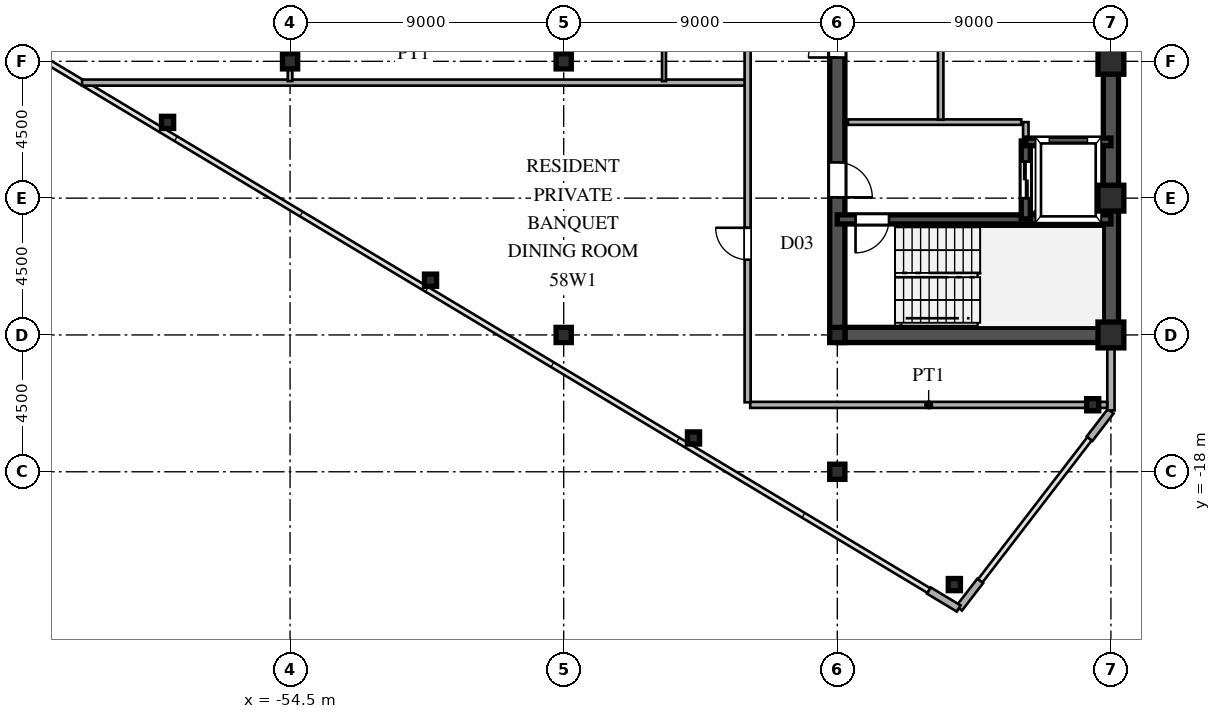
"""IFC4 building model, lengths in metres.
Left out: names, types, materials, properties, quantities, classifications, styles, units other than length and angle.
Written with IfcOpenShell. Run it as: python <this file> out.ifc"""

import sys

from ifc_helpers import new_model, si_unit, direction, frame, frame_2d, origin, origin_2d, place, context, subcontext, project, spatial, rectangle, hollow_rectangle, i_section, extrude, source, transform, mapped, element, fill, save


model = new_model("IFC4")
c1 = context("Model", 3, precision=1e-05, world=origin(), true_north=direction((0.0, 1.0)))
c2 = subcontext(c1, "Body", "Model", "MODEL_VIEW")
j1 = project(units=[si_unit("LENGTHUNIT", "METRE"), si_unit("PLANEANGLEUNIT", "RADIAN")], contexts=[c1])
p1 = place(None, origin())
s1 = spatial("IfcSite", under=j1, at=p1, CompositionType="ELEMENT")
p2 = place(p1, origin())
s2 = spatial("IfcBuilding", under=s1, at=p2, CompositionType="ELEMENT")
p3 = place(p2, frame((0.0, 0.0, 217.5)))
s3 = spatial("IfcBuildingStorey", under=s2, at=p3, CompositionType="ELEMENT", Elevation=217.5)
m1 = source(origin(), c2, "Body", "SweptSolid", [
    extrude(hollow_rectangle(XDim=0.85, YDim=0.85, WallThickness=0.036, at=origin_2d()), origin(), (0.0, 0.0, 1.0), 3.6),
])
for number, where, z_axis, x_axis in (
    (1, (-27.5, -13.5, 0.0), (0.0, 0.0, 1.0), (1.0, 0.0, 0.0)),
    (2, (-27.5, -9.0, 0.0), (0.0, 0.0, 1.0), (1.0, 0.0, 0.0)),
    (3, (-27.5, -4.5, 0.0), (0.0, 0.0, 1.0), (1.0, 0.0, 0.0)),
):
    element("IfcColumn", number, at=place(p3, frame(where, z_axis=z_axis, x_axis=x_axis)), inside=s3, PredefinedType="COLUMN", context=c2, shape_type="MappedRepresentation", body=[
        mapped(m1, transform((0.0, 0.0, 0.0), scale=1.0)),
    ])
m2 = source(origin(), c2, "Body", "SweptSolid", [
    extrude(i_section(OverallWidth=0.5, OverallDepth=0.5, WebThickness=0.02, FlangeThickness=0.032, at=origin_2d()), origin(), (0.0, 0.0, 1.0), 3.6),
])
for number, where, z_axis, x_axis in (
    (4, (-36.5, -18.0, 0.0), (0.0, 0.0, 1.0), (1.0, 0.0, 0.0)),
    (5, (-36.5, -13.5, 0.0), (0.0, 0.0, 1.0), (1.0, 0.0, 0.0)),
    (6, (-45.5, -13.5, 0.0), (0.0, 0.0, 1.0), (1.0, 0.0, 0.0)),
    (7, (-45.5, -4.5, 0.0), (0.0, 0.0, 1.0), (1.0, 0.0, 0.0)),
    (8, (-54.5, -4.5, 0.0), (0.0, 0.0, 1.0), (1.0, 0.0, 0.0)),
):
    element("IfcColumn", number, at=place(p3, frame(where, z_axis=z_axis, x_axis=x_axis)), inside=s3, PredefinedType="COLUMN", context=c2, shape_type="MappedRepresentation", body=[
        mapped(m2, transform((0.0, 0.0, 0.0), scale=1.0)),
    ])
m3 = source(origin(), c2, "Body", "SweptSolid", [
    extrude(hollow_rectangle(XDim=0.4, YDim=0.4, WallThickness=0.016, at=origin_2d()), origin(), (0.0, 0.0, 1.0), 3.6),
])
for number, where, z_axis, x_axis in (
    (9, (-28.1, -15.796, 0.0), (0.0, 0.0, 1.0), (1.0, 0.0, 0.0)),
    (10, (-32.65, -21.71, 0.0), (0.0, 0.0, 1.0), (1.0, 0.0, 0.0)),
    (11, (-41.23, -16.889, 0.0), (0.0, 0.0, 1.0), (1.0, 0.0, 0.0)),
    (12, (-49.88, -11.699, 0.0), (0.0, 0.0, 1.0), (1.0, 0.0, 0.0)),
    (13, (-58.53, -6.509, 0.0), (0.0, 0.0, 1.0), (1.0, 0.0, 0.0)),
):
    element("IfcColumn", number, at=place(p3, frame(where, z_axis=z_axis, x_axis=x_axis)), inside=s3, PredefinedType="COLUMN", context=c2, shape_type="MappedRepresentation", body=[
        mapped(m3, transform((0.0, 0.0, 0.0), scale=1.0)),
    ])
p4 = place(p3, frame((-27.5, -15.98, 0.0), z_axis=(0.0, 0.0, 1.0), x_axis=(0.0, 1.0, 0.0)))
e14 = element("IfcWall", 14, at=p4, inside=s3, PredefinedType="SOLIDWALL", context=c2, shape_type="SweptSolid", body=[
    extrude(rectangle(XDim=1.605, YDim=0.24, at=frame_2d((0.803, 0.0))), origin(), (0.0, 0.0, 1.0), 3.38),
])
p5 = place(p3, frame((-27.5, -14.375, 0.0), z_axis=(0.0, 0.0, 1.0), x_axis=(0.0, 1.0, 0.0)))
e15 = element("IfcWall", 15, at=p5, inside=s3, PredefinedType="SOLIDWALL", context=c2, shape_type="SweptSolid", body=[
    extrude(rectangle(XDim=0.62, YDim=0.24, at=frame_2d((0.31, 0.0))), origin(), (0.0, 0.0, 1.0), 2.88),
])
for number, where, z_axis, x_axis in (
    (16, (-33.486, -21.908, 0.0), (0.0, 0.0, 1.0), (0.857, -0.515, 0.0)),
    (17, (-32.494, -22.492, 0.0), (0.0, 0.0, 1.0), (0.61, 0.793, 0.0)),
    (18, (-28.201, -16.912, 0.0), (0.0, 0.0, 1.0), (0.61, 0.793, 0.0)),
):
    element("IfcWall", number, at=place(p3, frame(where, z_axis=z_axis, x_axis=x_axis)), inside=s3, PredefinedType="SOLIDWALL", context=c2, shape_type="SweptSolid", body=[
        extrude(rectangle(XDim=1.14, YDim=0.24, at=frame_2d((0.57, 0.0))), origin(), (0.0, 0.0, 1.0), 3.38),
    ])
p6 = place(p3, frame((-27.5, -13.5, 0.0), z_axis=(0.0, 0.0, 1.0), x_axis=(0.0, 1.0, 0.0)))
e19 = element("IfcWall", 19, at=p6, inside=s3, PredefinedType="SHEAR", context=c2, shape_type="SweptSolid", body=[
    extrude(rectangle(XDim=12.2, YDim=0.5, at=frame_2d((6.1, 0.0))), origin(), (0.0, 0.0, 1.0), 3.38),
])
p7 = place(p3, frame((-36.5, -13.5, 0.0), z_axis=(0.0, 0.0, 1.0), x_axis=(1.0, 0.0, 0.0)))
e20 = element("IfcWall", 20, at=p7, inside=s3, PredefinedType="SHEAR", context=c2, shape_type="SweptSolid", body=[
    extrude(rectangle(XDim=9.0, YDim=0.5, at=frame_2d((4.5, 0.0))), origin(), (0.0, 0.0, 1.0), 3.38),
])
p8 = place(p3, frame((-36.5, -13.65, 0.0), z_axis=(0.0, 0.0, 1.0), x_axis=(0.0, 1.0, 0.0)))
e21 = element("IfcWall", 21, at=p8, inside=s3, PredefinedType="SHEAR", context=c2, shape_type="SweptSolid", body=[
    extrude(rectangle(XDim=7.15, YDim=0.5, at=frame_2d((3.575, 0.0))), origin(), (0.0, 0.0, 1.0), 3.38),
])
p9 = place(p8, frame((4.675, 0.0, 0.0)))
e22 = element("IfcOpeningElement", 22, at=p9, cuts=e21, PredefinedType="OPENING", context=c2, shape_type="SweptSolid", body=[
    extrude(rectangle(XDim=1.15, YDim=2.2, at=frame_2d((0.575, 1.1))), frame((0.0, 0.26, 0.0), z_axis=(0.0, -1.0, 0.0), x_axis=(1.0, 0.0, 0.0)), (0.0, 0.0, 1.0), 0.52),
])
p10 = place(p3, frame((-36.5, -6.5, 0.0), z_axis=(0.0, 0.0, 1.0), x_axis=(0.0, 1.0, 0.0)))
e23 = element("IfcWall", 23, at=p10, inside=s3, PredefinedType="SHEAR", context=c2, shape_type="SweptSolid", body=[
    extrude(rectangle(XDim=5.2, YDim=0.5, at=frame_2d((2.6, 0.0))), origin(), (0.0, 0.0, 1.0), 3.38),
])
p11 = place(p10, frame((2.125, 0.0, 0.0)))
e24 = element("IfcOpeningElement", 24, at=p11, cuts=e23, PredefinedType="OPENING", context=c2, shape_type="SweptSolid", body=[
    extrude(rectangle(XDim=0.95, YDim=2.15, at=frame_2d((0.475, 1.075))), frame((0.0, 0.26, 0.0), z_axis=(0.0, -1.0, 0.0), x_axis=(1.0, 0.0, 0.0)), (0.0, 0.0, 1.0), 0.52),
])
p12 = place(p3, frame((-36.5, -9.7, 0.0), z_axis=(0.0, 0.0, 1.0), x_axis=(1.0, 0.0, 0.0)))
e25 = element("IfcWall", 25, at=p12, inside=s3, PredefinedType="SHEAR", context=c2, shape_type="SweptSolid", body=[
    extrude(rectangle(XDim=9.0, YDim=0.3, at=frame_2d((4.5, 0.0))), origin(), (0.0, 0.0, 1.0), 3.38),
])
p13 = place(p12, frame((0.6, 0.0, 0.0)))
e26 = element("IfcOpeningElement", 26, at=p13, cuts=e25, PredefinedType="OPENING", context=c2, shape_type="SweptSolid", body=[
    extrude(rectangle(XDim=1.1, YDim=2.2, at=frame_2d((0.55, 1.1))), frame((0.0, 0.16, 0.0), z_axis=(0.0, -1.0, 0.0), x_axis=(1.0, 0.0, 0.0)), (0.0, 0.0, 1.0), 0.32),
])
p14 = place(p3, frame((-30.3, -7.15, 0.0), z_axis=(0.0, 0.0, 1.0), x_axis=(1.0, 0.0, 0.0)))
e27 = element("IfcWall", 27, at=p14, inside=s3, PredefinedType="SHEAR", context=c2, shape_type="SweptSolid", body=[
    extrude(rectangle(XDim=2.8, YDim=0.25, at=frame_2d((1.4, 0.0))), origin(), (0.0, 0.0, 1.0), 3.38),
])
p15 = place(p3, frame((-30.3, -9.68, 0.0), z_axis=(0.0, 0.0, 1.0), x_axis=(0.0, 1.0, 0.0)))
e28 = element("IfcWall", 28, at=p15, inside=s3, PredefinedType="SHEAR", context=c2, shape_type="SweptSolid", body=[
    extrude(rectangle(XDim=2.56, YDim=0.3, at=frame_2d((1.28, 0.0))), origin(), (0.0, 0.0, 1.0), 3.38),
])
p16 = place(p15, frame((0.68, 0.0, 0.0)))
e29 = element("IfcOpeningElement", 29, at=p16, cuts=e28, PredefinedType="OPENING", context=c2, shape_type="SweptSolid", body=[
    extrude(rectangle(XDim=1.2, YDim=2.25, at=frame_2d((0.6, 1.125))), frame((0.0, 0.16, 0.0), z_axis=(0.0, -1.0, 0.0), x_axis=(1.0, 0.0, 0.0)), (0.0, 0.0, 1.0), 0.32),
])
p17 = place(p3, frame((-36.15, -6.5, 0.0), z_axis=(0.0, 0.0, 1.0), x_axis=(1.0, 0.0, 0.0)))
e30 = element("IfcWall", 30, at=p17, inside=s3, PredefinedType="PARTITIONING", context=c2, shape_type="SweptSolid", body=[
    extrude(rectangle(XDim=5.7, YDim=0.18, at=frame_2d((2.85, 0.0))), origin(), (0.0, 0.0, 1.0), 3.38),
])
p18 = place(p3, frame((-30.3, -7.12, 0.0), z_axis=(0.0, 0.0, 1.0), x_axis=(0.0, 1.0, 0.0)))
e31 = element("IfcWall", 31, at=p18, inside=s3, PredefinedType="PARTITIONING", context=c2, shape_type="SweptSolid", body=[
    extrude(rectangle(XDim=0.62, YDim=0.18, at=frame_2d((0.31, 0.0))), origin(), (0.0, 0.0, 1.0), 3.38),
])
p19 = place(p3, frame((-33.1, -6.42, 0.0), z_axis=(0.0, 0.0, 1.0), x_axis=(0.0, 1.0, 0.0)))
e32 = element("IfcWall", 32, at=p19, inside=s3, PredefinedType="PARTITIONING", context=c2, shape_type="SweptSolid", body=[
    extrude(rectangle(XDim=5.04, YDim=0.18, at=frame_2d((2.52, 0.0))), origin(), (0.0, 0.0, 1.0), 3.38),
])
p20 = place(p3, frame((-39.365, -15.8, 0.0), z_axis=(0.0, 0.0, 1.0), x_axis=(1.0, 0.0, 0.0)))
e33 = element("IfcWall", 33, at=p20, inside=s3, PredefinedType="PARTITIONING", context=c2, shape_type="SweptSolid", body=[
    extrude(rectangle(XDim=11.74, YDim=0.2, at=frame_2d((5.87, 0.0))), origin(), (0.0, 0.0, 1.0), 3.38),
])
p21 = place(p3, frame((-61.343, -5.2, 0.0), z_axis=(0.0, 0.0, 1.0), x_axis=(1.0, 0.0, 0.0)))
e34 = element("IfcWall", 34, at=p21, inside=s3, PredefinedType="PARTITIONING", context=c2, shape_type="SweptSolid", body=[
    extrude(rectangle(XDim=21.813, YDim=0.2, at=frame_2d((10.906, 0.0))), origin(), (0.0, 0.0, 1.0), 3.38),
])
p22 = place(p3, frame((-54.5, -5.15, 0.0), z_axis=(0.0, 0.0, 1.0), x_axis=(0.0, 1.0, 0.0)))
e35 = element("IfcWall", 35, at=p22, inside=s3, PredefinedType="PARTITIONING", context=c2, shape_type="SweptSolid", body=[
    extrude(rectangle(XDim=12.7, YDim=0.15, at=frame_2d((6.35, 0.0))), origin(), (0.0, 0.0, 1.0), 2.78),
])
p23 = place(p22, frame((5.875, 0.0, 0.0)))
e36 = element("IfcOpeningElement", 36, at=p23, cuts=e35, PredefinedType="OPENING", context=c2, shape_type="SweptSolid", body=[
    extrude(rectangle(XDim=0.95, YDim=2.15, at=frame_2d((0.475, 1.075))), frame((0.0, 0.085, 0.0), z_axis=(0.0, -1.0, 0.0), x_axis=(1.0, 0.0, 0.0)), (0.0, 0.0, 1.0), 0.17),
])
p24 = place(p3, frame((-42.2, -5.15, 0.0), z_axis=(0.0, 0.0, 1.0), x_axis=(0.0, 1.0, 0.0)))
e37 = element("IfcWall", 37, at=p24, inside=s3, PredefinedType="PARTITIONING", context=c2, shape_type="SweptSolid", body=[
    extrude(rectangle(XDim=3.354, YDim=0.13, at=frame_2d((1.677, 0.0))), origin(), (0.0, 0.0, 1.0), 3.38),
])
p25 = place(p3, frame((-39.45, -15.715, 0.0), z_axis=(0.0, 0.0, 1.0), x_axis=(0.0, 1.0, 0.0)))
e38 = element("IfcWall", 38, at=p25, inside=s3, PredefinedType="PARTITIONING", context=c2, shape_type="SweptSolid", body=[
    extrude(rectangle(XDim=31.43, YDim=0.2, at=frame_2d((15.715, 0.0))), origin(), (0.0, 0.0, 1.0), 3.38),
])
p26 = place(p25, frame((4.69, 0.0, 0.0)))
e39 = element("IfcOpeningElement", 39, at=p26, cuts=e38, PredefinedType="OPENING", context=c2, shape_type="SweptSolid", body=[
    extrude(rectangle(XDim=1.05, YDim=2.25, at=frame_2d((0.525, 1.125))), frame((0.0, 0.11, 0.0), z_axis=(0.0, -1.0, 0.0), x_axis=(1.0, 0.0, 0.0)), (0.0, 0.0, 1.0), 0.22),
])
p27 = place(p25, frame((16.198, 0.0, 0.0)))
e40 = element("IfcOpeningElement", 40, at=p27, cuts=e38, PredefinedType="OPENING", context=c2, shape_type="SweptSolid", body=[
    extrude(rectangle(XDim=1.05, YDim=2.25, at=frame_2d((0.525, 1.125))), frame((0.0, 0.11, 0.0), z_axis=(0.0, -1.0, 0.0), x_axis=(1.0, 0.0, 0.0)), (0.0, 0.0, 1.0), 0.22),
])
p28 = place(p25, frame((24.188, 0.0, 0.0)))
e41 = element("IfcOpeningElement", 41, at=p28, cuts=e38, PredefinedType="OPENING", context=c2, shape_type="SweptSolid", body=[
    extrude(rectangle(XDim=1.05, YDim=2.25, at=frame_2d((0.525, 1.125))), frame((0.0, 0.11, 0.0), z_axis=(0.0, -1.0, 0.0), x_axis=(1.0, 0.0, 0.0)), (0.0, 0.0, 1.0), 0.22),
])
m4 = source(origin(), c2, "Body", "SweptSolid", [
    extrude(rectangle(XDim=1.15, YDim=2.2, at=frame_2d((0.575, 1.1))), frame((0.0, 0.025, 0.0), z_axis=(0.0, -1.0, 0.0), x_axis=(1.0, 0.0, 0.0)), (0.0, 0.0, 1.0), 0.05),
])
p29 = place(p9, frame((1.15, 0.0, 0.0), z_axis=(0.0, 0.0, 1.0), x_axis=(-1.0, 0.0, 0.0)))
e42 = element("IfcDoor", 42, at=p29, inside=s3, OperationType="SINGLE_SWING_LEFT", PredefinedType="DOOR", context=c2, shape_type="MappedRepresentation", body=[
    mapped(m4, transform((0.0, 0.0, 0.0), scale=1.0)),
])
fill(e22, e42)
m5 = source(origin(), c2, "Body", "SweptSolid", [
    extrude(rectangle(XDim=0.95, YDim=2.15, at=frame_2d((0.475, 1.075))), frame((0.0, 0.025, 0.0), z_axis=(0.0, -1.0, 0.0), x_axis=(1.0, 0.0, 0.0)), (0.0, 0.0, 1.0), 0.05),
])
p30 = place(p11, origin())
e43 = element("IfcDoor", 43, at=p30, inside=s3, OperationType="SINGLE_SWING_LEFT", PredefinedType="DOOR", context=c2, shape_type="MappedRepresentation", body=[
    mapped(m5, transform((0.0, 0.0, 0.0), scale=1.0)),
])
fill(e24, e43)
m6 = source(origin(), c2, "Body", "SweptSolid", [
    extrude(rectangle(XDim=1.1, YDim=2.2, at=frame_2d((0.55, 1.1))), frame((0.0, 0.025, 0.0), z_axis=(0.0, -1.0, 0.0), x_axis=(1.0, 0.0, 0.0)), (0.0, 0.0, 1.0), 0.05),
])
p31 = place(p13, frame((1.1, 0.0, 0.0), z_axis=(0.0, 0.0, 1.0), x_axis=(-1.0, 0.0, 0.0)))
e44 = element("IfcDoor", 44, at=p31, inside=s3, OperationType="SINGLE_SWING_LEFT", PredefinedType="DOOR", context=c2, shape_type="MappedRepresentation", body=[
    mapped(m6, transform((0.0, 0.0, 0.0), scale=1.0)),
])
fill(e26, e44)
m7 = source(origin(), c2, "Body", "SweptSolid", [
    extrude(rectangle(XDim=1.2, YDim=2.25, at=frame_2d((0.6, 1.125))), frame((0.0, 0.025, 0.0), z_axis=(0.0, -1.0, 0.0), x_axis=(1.0, 0.0, 0.0)), (0.0, 0.0, 1.0), 0.05),
])
p32 = place(p16, origin())
e45 = element("IfcDoor", 45, at=p32, inside=s3, OperationType="DOUBLE_DOOR_SLIDING", PredefinedType="DOOR", context=c2, shape_type="MappedRepresentation", body=[
    mapped(m7, transform((0.0, 0.0, 0.0), scale=1.0)),
])
fill(e29, e45)
m8 = source(origin(), c2, "Body", "SweptSolid", [
    extrude(rectangle(XDim=1.05, YDim=2.25, at=frame_2d((0.525, 1.125))), frame((0.0, 0.025, 0.0), z_axis=(0.0, -1.0, 0.0), x_axis=(1.0, 0.0, 0.0)), (0.0, 0.0, 1.0), 0.05),
])
p33 = place(p26, origin())
e46 = element("IfcDoor", 46, at=p33, inside=s3, OperationType="SINGLE_SWING_RIGHT", PredefinedType="DOOR", context=c2, shape_type="MappedRepresentation", body=[
    mapped(m8, transform((0.0, 0.0, 0.0), scale=1.0)),
])
fill(e39, e46)
save(model, sys.argv[1])
